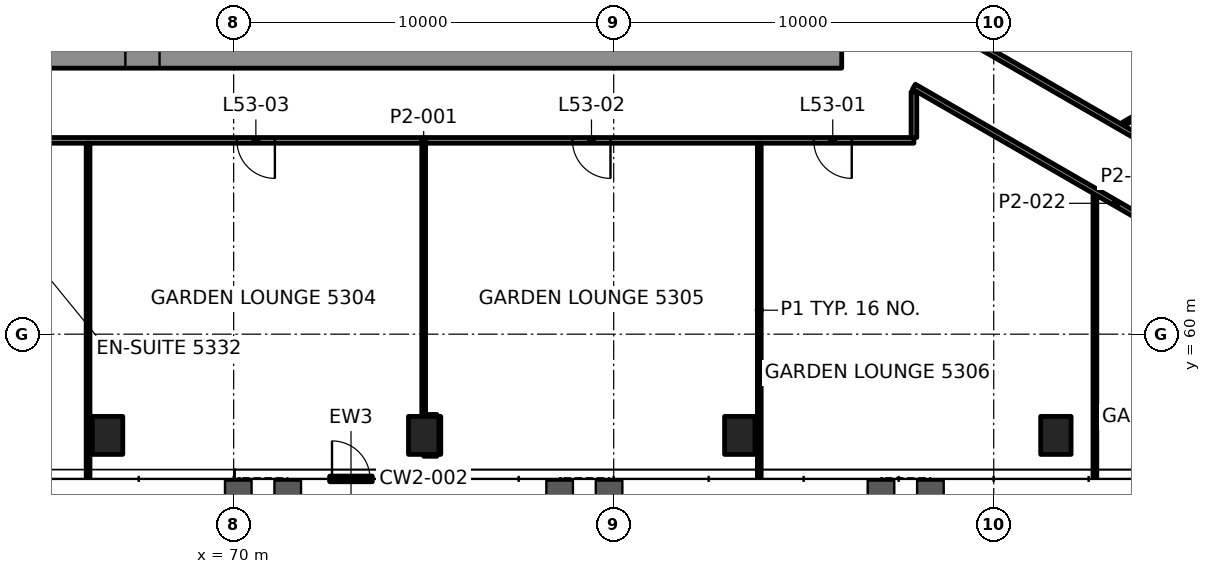
"""IFC4 building model, lengths in metres.
Left out: names, types, materials, properties, quantities, classifications, styles, units other than length and angle.
Written with IfcOpenShell. Run it as: python <this file> out.ifc"""

import sys

from ifc_helpers import new_model, si_unit, direction, frame, frame_2d, origin, origin_2d, place, context, subcontext, project, spatial, rectangle, hollow_rectangle, extrude, element, fill, save


model = new_model("IFC4")
c1 = context("Model", 3, precision=1e-05, world=origin(), true_north=direction((0.0, 1.0)))
c2 = subcontext(c1, "Body", "Model", "MODEL_VIEW")
j1 = project(units=[si_unit("LENGTHUNIT", "METRE"), si_unit("PLANEANGLEUNIT", "RADIAN")], contexts=[c1])
p1 = place(None, origin())
s1 = spatial("IfcSite", under=j1, at=p1, CompositionType="ELEMENT")
p2 = place(p1, origin())
s2 = spatial("IfcBuilding", under=s1, at=p2, CompositionType="ELEMENT")
p3 = place(p2, frame((0.0, 0.0, 226.0)))
s3 = spatial("IfcBuildingStorey", under=s2, at=p3, CompositionType="ELEMENT", Elevation=226.0)
for number, where, z_axis, x_axis in (
    (1, (66.682, 57.337, -0.0), (0.0, 0.0, 1.0), (1.0, 0.0, 0.0)),
    (2, (75.0, 57.337, -0.0), (0.0, 0.0, 1.0), (1.0, 0.0, 0.0)),
    (3, (83.318, 57.337, -0.0), (0.0, 0.0, 1.0), (1.0, 0.0, 0.0)),
    (4, (91.635, 57.337, -0.0), (0.0, 0.0, 1.0), (1.0, 0.0, 0.0)),
):
    element("IfcColumn", number, at=place(p3, frame(where, z_axis=z_axis, x_axis=x_axis)), inside=s3, PredefinedType="COLUMN", context=c2, shape_type="SweptSolid", body=[
        extrude(hollow_rectangle(XDim=0.8, YDim=1.0, WallThickness=0.05, at=origin_2d()), origin(), (0.0, 0.0, 1.0), 3.9),
    ])
p4 = place(p3, frame((64.0, 67.375, 0.0), z_axis=(0.0, 0.0, 1.0), x_axis=(1.0, 0.0, 0.0)))
e5 = element("IfcWall", 5, at=p4, inside=s3, PredefinedType="SHEAR", context=c2, shape_type="SweptSolid", body=[
    extrude(rectangle(XDim=22.0, YDim=0.75, at=frame_2d((11.0, 0.0))), origin(), (0.0, 0.0, 1.0), 3.7),
])
p5 = place(p4, frame((3.15, 0.0, 0.0)))
e6 = element("IfcOpeningElement", 6, at=p5, cuts=e5, PredefinedType="OPENING", context=c2, shape_type="SweptSolid", body=[
    extrude(rectangle(XDim=0.9, YDim=2.1, at=frame_2d((0.45, 1.05))), frame((0.0, 0.385, 0.0), z_axis=(0.0, -1.0, 0.0), x_axis=(1.0, 0.0, 0.0)), (0.0, 0.0, 1.0), 0.77),
])
p6 = place(p3, frame((75.0, 56.837, 0.0), z_axis=(0.0, 0.0, 1.0), x_axis=(1.0, 0.0, 0.0)))
e7 = element("IfcWall", 7, at=p6, inside=s3, PredefinedType="PARTITIONING", context=c2, shape_type="SweptSolid", body=[
    extrude(rectangle(XDim=0.35, YDim=0.1, at=frame_2d((0.175, 0.0))), origin(), (0.0, 0.0, 1.0), 3.1),
])
p7 = place(p3, frame((75.05, 57.837, 0.0), z_axis=(0.0, 0.0, 1.0), x_axis=(1.0, 0.0, 0.0)))
e8 = element("IfcWall", 8, at=p7, inside=s3, PredefinedType="PARTITIONING", context=c2, shape_type="SweptSolid", body=[
    extrude(rectangle(XDim=0.3, YDim=0.1, at=frame_2d((0.15, 0.0))), origin(), (0.0, 0.0, 1.0), 3.1),
])
p8 = place(p3, frame((87.899, 65.1, 0.0), z_axis=(0.0, 0.0, 1.0), x_axis=(-1.0, 0.0, 0.0)))
e9 = element("IfcWall", 9, at=p8, inside=s3, PredefinedType="PARTITIONING", context=c2, shape_type="SweptSolid", body=[
    extrude(rectangle(XDim=25.799, YDim=0.15, at=frame_2d((12.899, 0.0))), origin(), (0.0, 0.0, 1.0), 3.1),
])
p9 = place(p8, frame((1.636, 0.0, 0.0)))
e10 = element("IfcOpeningElement", 10, at=p9, cuts=e9, PredefinedType="OPENING", context=c2, shape_type="SweptSolid", body=[
    extrude(rectangle(XDim=1.0, YDim=2.1, at=frame_2d((0.5, 1.05))), frame((0.0, 0.085, 0.0), z_axis=(0.0, -1.0, 0.0), x_axis=(1.0, 0.0, 0.0)), (0.0, 0.0, 1.0), 0.17),
])
p10 = place(p8, frame((7.984, 0.0, 0.0)))
e11 = element("IfcOpeningElement", 11, at=p10, cuts=e9, PredefinedType="OPENING", context=c2, shape_type="SweptSolid", body=[
    extrude(rectangle(XDim=1.0, YDim=2.1, at=frame_2d((0.5, 1.05))), frame((0.0, 0.085, 0.0), z_axis=(0.0, -1.0, 0.0), x_axis=(1.0, 0.0, 0.0)), (0.0, 0.0, 1.0), 0.17),
])
p11 = place(p8, frame((16.815, 0.0, 0.0)))
e12 = element("IfcOpeningElement", 12, at=p11, cuts=e9, PredefinedType="OPENING", context=c2, shape_type="SweptSolid", body=[
    extrude(rectangle(XDim=1.0, YDim=2.1, at=frame_2d((0.5, 1.05))), frame((0.0, 0.085, 0.0), z_axis=(0.0, -1.0, 0.0), x_axis=(1.0, 0.0, 0.0)), (0.0, 0.0, 1.0), 0.17),
])
p12 = place(p8, frame((23.163, 0.0, 0.0)))
e13 = element("IfcOpeningElement", 13, at=p12, cuts=e9, PredefinedType="OPENING", context=c2, shape_type="SweptSolid", body=[
    extrude(rectangle(XDim=1.0, YDim=2.1, at=frame_2d((0.5, 1.05))), frame((0.0, 0.085, 0.0), z_axis=(0.0, -1.0, 0.0), x_axis=(1.0, 0.0, 0.0)), (0.0, 0.0, 1.0), 0.17),
])
p13 = place(p3, frame((93.406, 65.529, 0.0), z_axis=(0.0, 0.0, 1.0), x_axis=(0.866032295486, 0.499988063033, 0.0)))
e14 = element("IfcWall", 14, at=p13, inside=s3, PredefinedType="PARTITIONING", context=c2, shape_type="SweptSolid", body=[
    extrude(rectangle(XDim=7.559, YDim=0.1, at=frame_2d((3.779, 0.0))), origin(), (0.0, 0.0, 1.0), 3.1),
])
p14 = place(p3, frame((92.662, 56.237, 0.0), z_axis=(0.0, 0.0, 1.0), x_axis=(0.0, 1.0, 0.0)))
e15 = element("IfcWall", 15, at=p14, inside=s3, PredefinedType="PARTITIONING", context=c2, shape_type="SweptSolid", body=[
    extrude(rectangle(XDim=7.41, YDim=0.1, at=frame_2d((3.705, 0.0))), origin(), (0.0, 0.0, 1.0), 3.1),
])
p15 = place(p3, frame((87.9, 65.176, 0.0), z_axis=(0.0, 0.0, 1.0), x_axis=(0.0, 1.0, 0.0)))
e16 = element("IfcWall", 16, at=p15, inside=s3, PredefinedType="PARTITIONING", context=c2, shape_type="SweptSolid", body=[
    extrude(rectangle(XDim=1.201, YDim=0.15, at=frame_2d((0.6, 0.0))), origin(), (0.0, 0.0, 1.0), 2.947),
])
p16 = place(p3, frame((83.831, 56.237, 0.0), z_axis=(0.0, 0.0, 1.0), x_axis=(0.0, 1.0, 0.0)))
e17 = element("IfcWall", 17, at=p16, inside=s3, PredefinedType="PARTITIONING", context=c2, shape_type="SweptSolid", body=[
    extrude(rectangle(XDim=8.788, YDim=0.1, at=frame_2d((4.394, 0.0))), origin(), (0.0, 0.0, 1.0), 3.022),
])
p17 = place(p3, frame((75.4, 56.837, 0.0), z_axis=(0.0, 0.0, 1.0), x_axis=(0.0, 1.0, 0.0)))
e18 = element("IfcWall", 18, at=p17, inside=s3, PredefinedType="PARTITIONING", context=c2, shape_type="SweptSolid", body=[
    extrude(rectangle(XDim=0.999, YDim=0.1, at=frame_2d((0.5, 0.0))), origin(), (0.0, 0.0, 1.0), 3.022),
])
p18 = place(p3, frame((75.0, 57.837, 0.0), z_axis=(0.0, 0.0, 1.0), x_axis=(0.0, 1.0, 0.0)))
e19 = element("IfcWall", 19, at=p18, inside=s3, PredefinedType="PARTITIONING", context=c2, shape_type="SweptSolid", body=[
    extrude(rectangle(XDim=7.188, YDim=0.1, at=frame_2d((3.594, 0.0))), origin(), (0.0, 0.0, 1.0), 3.1),
])
p19 = place(p3, frame((66.169, 56.237, 0.0), z_axis=(0.0, 0.0, 1.0), x_axis=(0.0, 1.0, 0.0)))
e20 = element("IfcWall", 20, at=p19, inside=s3, PredefinedType="PARTITIONING", context=c2, shape_type="SweptSolid", body=[
    extrude(rectangle(XDim=8.788, YDim=0.1, at=frame_2d((4.394, 0.0))), origin(), (0.0, 0.0, 1.0), 3.022),
])
p20 = place(p3, frame((87.975, 68.548, 0.0), z_axis=(0.0, 0.0, 1.0), x_axis=(0.866030071145, -0.499991915808, 0.0)))
e21 = element("IfcWall", 21, at=p20, inside=s3, PredefinedType="PARTITIONING", context=c2, shape_type="SweptSolid", body=[
    extrude(rectangle(XDim=13.228, YDim=0.15, at=frame_2d((6.614, 0.0))), origin(), (0.0, 0.0, 1.0), 3.1),
])
p21 = place(p20, frame((9.09, 0.0, 0.0)))
e22 = element("IfcOpeningElement", 22, at=p21, cuts=e21, PredefinedType="OPENING", context=c2, shape_type="SweptSolid", body=[
    extrude(rectangle(XDim=1.0, YDim=2.1, at=frame_2d((0.5, 1.05))), frame((0.0, 0.085, 0.0), z_axis=(0.0, -1.0, 0.0), x_axis=(1.0, 0.0, 0.0)), (0.0, 0.0, 1.0), 0.17),
])
p22 = place(p3, frame((98.531, 60.375, 0.0), z_axis=(0.0, 0.0, 1.0), x_axis=(-0.866027942666, 0.499995602502, 0.0)))
e23 = element("IfcWall", 23, at=p22, inside=s3, PredefinedType="PARTITIONING", context=c2, shape_type="SweptSolid", body=[
    extrude(rectangle(XDim=12.276, YDim=0.15, at=frame_2d((6.138, 0.0))), origin(), (0.0, 0.0, 1.0), 2.947),
])
p23 = place(p22, frame((2.99, 0.0, 0.0)))
e24 = element("IfcOpeningElement", 24, at=p23, cuts=e23, PredefinedType="OPENING", context=c2, shape_type="SweptSolid", body=[
    extrude(rectangle(XDim=1.0, YDim=2.1, at=frame_2d((0.5, 1.05))), frame((0.0, 0.085, 0.0), z_axis=(0.0, -1.0, 0.0), x_axis=(1.0, 0.0, 0.0)), (0.0, 0.0, 1.0), 0.17),
])
p24 = place(p3, frame((107.245, 63.176, 0.0), z_axis=(0.0, 0.0, 1.0), x_axis=(-0.500002275173, 0.866024090209, 0.0)))
e25 = element("IfcWall", 25, at=p24, inside=s3, PredefinedType="SOLIDWALL", context=c2, shape_type="SweptSolid", body=[
    extrude(rectangle(XDim=30.436, YDim=0.8, at=frame_2d((15.218, 0.0))), origin(), (0.0, 0.0, 1.0), 0.9),
])
p25 = place(p9, origin())
e26 = element("IfcDoor", 26, at=p25, inside=s3, OperationType="SINGLE_SWING_RIGHT", PredefinedType="DOOR", context=c2, shape_type="SweptSolid", body=[
    extrude(rectangle(XDim=1.0, YDim=2.1, at=frame_2d((0.5, 1.05))), frame((0.0, 0.025, 0.0), z_axis=(0.0, -1.0, 0.0), x_axis=(1.0, 0.0, 0.0)), (0.0, 0.0, 1.0), 0.05),
])
fill(e10, e26)
p26 = place(p10, origin())
e27 = element("IfcDoor", 27, at=p26, inside=s3, OperationType="SINGLE_SWING_LEFT", PredefinedType="DOOR", context=c2, shape_type="SweptSolid", body=[
    extrude(rectangle(XDim=1.0, YDim=2.1, at=frame_2d((0.5, 1.05))), frame((0.0, 0.025, 0.0), z_axis=(0.0, -1.0, 0.0), x_axis=(1.0, 0.0, 0.0)), (0.0, 0.0, 1.0), 0.05),
])
fill(e11, e27)
p27 = place(p11, origin())
e28 = element("IfcDoor", 28, at=p27, inside=s3, OperationType="SINGLE_SWING_RIGHT", PredefinedType="DOOR", context=c2, shape_type="SweptSolid", body=[
    extrude(rectangle(XDim=1.0, YDim=2.1, at=frame_2d((0.5, 1.05))), frame((0.0, 0.025, 0.0), z_axis=(0.0, -1.0, 0.0), x_axis=(1.0, 0.0, 0.0)), (0.0, 0.0, 1.0), 0.05),
])
fill(e12, e28)
p28 = place(p3, frame((72.528, 56.192, 0.0), z_axis=(0.0, 0.0, 1.0), x_axis=(1.0, 0.0, 0.0)))
p29 = place(p28, frame((0.06, 0.0, 0.0)))
p30 = place(p29, origin())
e29 = element("IfcDoor", 29, at=p30, inside=s3, OperationType="SINGLE_SWING_RIGHT", PredefinedType="DOOR", context=c2, shape_type="SweptSolid", body=[
    extrude(rectangle(XDim=1.0, YDim=2.1, at=frame_2d((0.5, 1.05))), frame((0.0, 0.025, 0.0), z_axis=(0.0, -1.0, 0.0), x_axis=(1.0, 0.0, 0.0)), (0.0, 0.0, 1.0), 0.05),
])
p31 = place(p5, origin())
e30 = element("IfcDoor", 30, at=p31, inside=s3, OperationType="SINGLE_SWING_LEFT", PredefinedType="DOOR", context=c2, shape_type="SweptSolid", body=[
    extrude(rectangle(XDim=0.9, YDim=2.1, at=frame_2d((0.45, 1.05))), frame((0.0, 0.095, 0.0), z_axis=(0.0, -1.0, 0.0), x_axis=(1.0, 0.0, 0.0)), (0.0, 0.0, 1.0), 0.19),
])
fill(e6, e30)
save(model, sys.argv[1])
